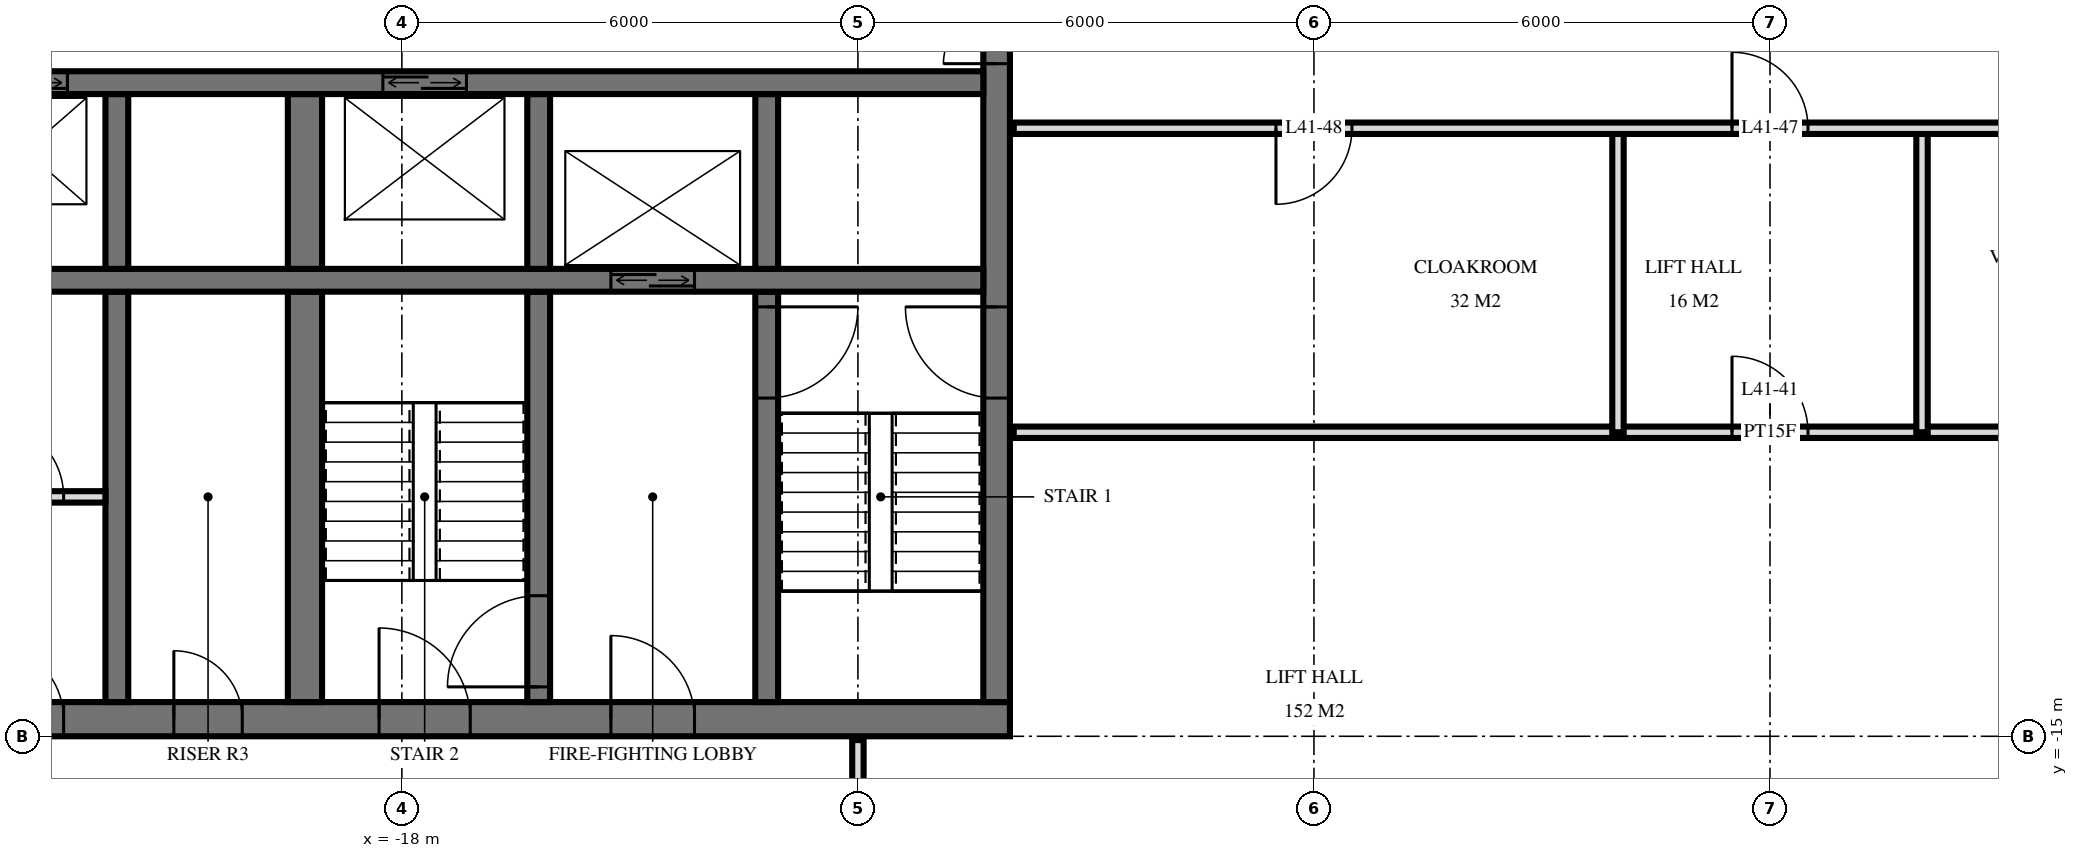
"""IFC4 building model, lengths in metres.
Left out: names, types, materials, properties, quantities, classifications, styles, units other than length and angle.
Written with IfcOpenShell. Run it as: python <this file> out.ifc"""

import sys

from ifc_helpers import new_model, si_unit, direction, frame, frame_2d, origin, place, context, subcontext, project, spatial, rectangle, extrude, element, fill, save


model = new_model("IFC4")
c1 = context("Model", 3, precision=1e-05, world=origin(), true_north=direction((0.0, 1.0)))
c2 = subcontext(c1, "Body", "Model", "MODEL_VIEW")
j1 = project(units=[si_unit("LENGTHUNIT", "METRE"), si_unit("PLANEANGLEUNIT", "RADIAN")], contexts=[c1])
p1 = place(None, origin())
s1 = spatial("IfcSite", under=j1, at=p1, CompositionType="ELEMENT")
p2 = place(p1, origin())
s2 = spatial("IfcBuilding", under=s1, at=p2, CompositionType="ELEMENT")
p3 = place(p2, frame((0.0, 0.0, 159.6)))
s3 = spatial("IfcBuildingStorey", under=s2, at=p3, CompositionType="ELEMENT", Elevation=159.6)
p4 = place(p3, frame((-24.5, -14.775, 0.0), z_axis=(0.0, 0.0, 1.0), x_axis=(1.0, 0.0, 0.0)))
e1 = element("IfcWall", 1, at=p4, inside=s3, PredefinedType="SHEAR", context=c2, shape_type="SweptSolid", body=[
    extrude(rectangle(XDim=14.5, YDim=0.45, at=frame_2d((7.25, 0.0))), origin(), (0.0, 0.0, 1.0), 3.6),
])
p5 = place(p4, frame((6.2, 0.0, 0.0)))
e2 = element("IfcOpeningElement", 2, at=p5, cuts=e1, PredefinedType="OPENING", context=c2, shape_type="SweptSolid", body=[
    extrude(rectangle(XDim=1.2, YDim=2.1, at=frame_2d((0.6, 1.05))), frame((0.0, 0.235, 0.0), z_axis=(0.0, -1.0, 0.0), x_axis=(1.0, 0.0, 0.0)), (0.0, 0.0, 1.0), 0.47),
])
p6 = place(p4, frame((9.25, 0.0, 0.0)))
e3 = element("IfcOpeningElement", 3, at=p6, cuts=e1, PredefinedType="OPENING", context=c2, shape_type="SweptSolid", body=[
    extrude(rectangle(XDim=1.1, YDim=2.1, at=frame_2d((0.55, 1.05))), frame((0.0, 0.235, 0.0), z_axis=(0.0, -1.0, 0.0), x_axis=(1.0, 0.0, 0.0)), (0.0, 0.0, 1.0), 0.47),
])
p7 = place(p4, frame((3.5, 0.0, 0.0)))
e4 = element("IfcOpeningElement", 4, at=p7, cuts=e1, PredefinedType="OPENING", context=c2, shape_type="SweptSolid", body=[
    extrude(rectangle(XDim=0.9, YDim=2.1, at=frame_2d((0.45, 1.05))), frame((0.0, 0.235, 0.0), z_axis=(0.0, -1.0, 0.0), x_axis=(1.0, 0.0, 0.0)), (0.0, 0.0, 1.0), 0.47),
])
p8 = place(p4, frame((1.05, 0.0, 0.0)))
e5 = element("IfcOpeningElement", 5, at=p8, cuts=e1, PredefinedType="OPENING", context=c2, shape_type="SweptSolid", body=[
    extrude(rectangle(XDim=1.0, YDim=2.1, at=frame_2d((0.5, 1.05))), frame((0.0, 0.235, 0.0), z_axis=(0.0, -1.0, 0.0), x_axis=(1.0, 0.0, 0.0)), (0.0, 0.0, 1.0), 0.47),
])
p9 = place(p3, frame((-10.175, -14.55, 0.0), z_axis=(0.0, 0.0, 1.0), x_axis=(0.0, 1.0, 0.0)))
e6 = element("IfcWall", 6, at=p9, inside=s3, PredefinedType="SHEAR", context=c2, shape_type="SweptSolid", body=[
    extrude(rectangle(XDim=14.1, YDim=0.35, at=frame_2d((7.05, 0.0))), origin(), (0.0, 0.0, 1.0), 3.6),
])
p10 = place(p9, frame((8.4, 0.0, 0.0)))
e7 = element("IfcOpeningElement", 7, at=p10, cuts=e6, PredefinedType="OPENING", context=c2, shape_type="SweptSolid", body=[
    extrude(rectangle(XDim=1.4, YDim=2.4, at=frame_2d((0.7, 1.2))), frame((0.0, 0.185, 0.0), z_axis=(0.0, -1.0, 0.0), x_axis=(1.0, 0.0, 0.0)), (0.0, 0.0, 1.0), 0.37),
])
p11 = place(p9, frame((10.0, 0.0, 0.0)))
e8 = element("IfcOpeningElement", 8, at=p11, cuts=e6, PredefinedType="OPENING", context=c2, shape_type="SweptSolid", body=[
    extrude(rectangle(XDim=1.4, YDim=2.4, at=frame_2d((0.7, 1.2))), frame((0.0, 0.185, 0.0), z_axis=(0.0, -1.0, 0.0), x_axis=(1.0, 0.0, 0.0)), (0.0, 0.0, 1.0), 0.37),
])
p12 = place(p9, frame((4.0, 0.0, 0.0)))
e9 = element("IfcOpeningElement", 9, at=p12, cuts=e6, PredefinedType="OPENING", context=c2, shape_type="SweptSolid", body=[
    extrude(rectangle(XDim=1.2, YDim=2.1, at=frame_2d((0.6, 1.05))), frame((0.0, 0.185, 0.0), z_axis=(0.0, -1.0, 0.0), x_axis=(1.0, 0.0, 0.0)), (0.0, 0.0, 1.0), 0.37),
])
p13 = place(p3, frame((-24.05, -6.4, 0.0), z_axis=(0.0, 0.0, 1.0), x_axis=(1.0, 0.0, 0.0)))
e10 = element("IfcWall", 10, at=p13, inside=s3, PredefinedType="SHEAR", context=c2, shape_type="SweptSolid", body=[
    extrude(rectangle(XDim=13.7, YDim=0.3, at=frame_2d((6.85, 0.0))), origin(), (0.0, 0.0, 1.0), 3.6),
])
p14 = place(p13, frame((0.55, 0.0, 0.0)))
e11 = element("IfcOpeningElement", 11, at=p14, cuts=e10, PredefinedType="OPENING", context=c2, shape_type="SweptSolid", body=[
    extrude(rectangle(XDim=1.1, YDim=2.1, at=frame_2d((0.55, 1.05))), frame((0.0, 0.16, 0.0), z_axis=(0.0, -1.0, 0.0), x_axis=(1.0, 0.0, 0.0)), (0.0, 0.0, 1.0), 0.32),
])
p15 = place(p13, frame((5.8, 0.0, 0.0)))
e12 = element("IfcOpeningElement", 12, at=p15, cuts=e10, PredefinedType="OPENING", context=c2, shape_type="SweptSolid", body=[
    extrude(rectangle(XDim=1.1, YDim=2.1, at=frame_2d((0.55, 1.05))), frame((0.0, 0.16, 0.0), z_axis=(0.0, -1.0, 0.0), x_axis=(1.0, 0.0, 0.0)), (0.0, 0.0, 1.0), 0.32),
])
p16 = place(p3, frame((-24.05, -9.0, 0.0), z_axis=(0.0, 0.0, 1.0), x_axis=(1.0, 0.0, 0.0)))
e13 = element("IfcWall", 13, at=p16, inside=s3, PredefinedType="SHEAR", context=c2, shape_type="SweptSolid", body=[
    extrude(rectangle(XDim=13.7, YDim=0.3, at=frame_2d((6.85, 0.0))), origin(), (0.0, 0.0, 1.0), 3.6),
])
p17 = place(p16, frame((8.8, 0.0, 0.0)))
e14 = element("IfcOpeningElement", 14, at=p17, cuts=e13, PredefinedType="OPENING", context=c2, shape_type="SweptSolid", body=[
    extrude(rectangle(XDim=1.1, YDim=2.1, at=frame_2d((0.55, 1.05))), frame((0.0, 0.16, 0.0), z_axis=(0.0, -1.0, 0.0), x_axis=(1.0, 0.0, 0.0)), (0.0, 0.0, 1.0), 0.32),
])
p18 = place(p3, frame((-13.2, -8.85, 0.0), z_axis=(0.0, 0.0, 1.0), x_axis=(0.0, 1.0, 0.0)))
e15 = element("IfcWall", 15, at=p18, inside=s3, PredefinedType="SHEAR", context=c2, shape_type="SweptSolid", body=[
    extrude(rectangle(XDim=2.3, YDim=0.3, at=frame_2d((1.15, 0.0))), origin(), (0.0, 0.0, 1.0), 3.6),
])
p19 = place(p3, frame((-13.2, -14.55, 0.0), z_axis=(0.0, 0.0, 1.0), x_axis=(0.0, 1.0, 0.0)))
e16 = element("IfcWall", 16, at=p19, inside=s3, PredefinedType="SHEAR", context=c2, shape_type="SweptSolid", body=[
    extrude(rectangle(XDim=5.4, YDim=0.3, at=frame_2d((2.7, 0.0))), origin(), (0.0, 0.0, 1.0), 3.6),
])
p20 = place(p19, frame((4.0, 0.0, 0.0)))
e17 = element("IfcOpeningElement", 17, at=p20, cuts=e16, PredefinedType="OPENING", context=c2, shape_type="SweptSolid", body=[
    extrude(rectangle(XDim=1.2, YDim=2.1, at=frame_2d((0.6, 1.05))), frame((0.0, 0.16, 0.0), z_axis=(0.0, -1.0, 0.0), x_axis=(1.0, 0.0, 0.0)), (0.0, 0.0, 1.0), 0.32),
])
p21 = place(p3, frame((-16.2, -8.85, 0.0), z_axis=(0.0, 0.0, 1.0), x_axis=(0.0, 1.0, 0.0)))
e18 = element("IfcWall", 18, at=p21, inside=s3, PredefinedType="SHEAR", context=c2, shape_type="SweptSolid", body=[
    extrude(rectangle(XDim=2.3, YDim=0.3, at=frame_2d((1.15, 0.0))), origin(), (0.0, 0.0, 1.0), 3.6),
])
p22 = place(p3, frame((-16.2, -14.55, 0.0), z_axis=(0.0, 0.0, 1.0), x_axis=(0.0, 1.0, 0.0)))
e19 = element("IfcWall", 19, at=p22, inside=s3, PredefinedType="SHEAR", context=c2, shape_type="SweptSolid", body=[
    extrude(rectangle(XDim=5.4, YDim=0.3, at=frame_2d((2.7, 0.0))), origin(), (0.0, 0.0, 1.0), 3.6),
])
p23 = place(p22, frame((0.2, 0.0, 0.0)))
e20 = element("IfcOpeningElement", 20, at=p23, cuts=e19, PredefinedType="OPENING", context=c2, shape_type="SweptSolid", body=[
    extrude(rectangle(XDim=1.2, YDim=2.1, at=frame_2d((0.6, 1.05))), frame((0.0, 0.16, 0.0), z_axis=(0.0, -1.0, 0.0), x_axis=(1.0, 0.0, 0.0)), (0.0, 0.0, 1.0), 0.32),
])
p24 = place(p3, frame((-19.275, -8.85, 0.0), z_axis=(0.0, 0.0, 1.0), x_axis=(0.0, 1.0, 0.0)))
e21 = element("IfcWall", 21, at=p24, inside=s3, PredefinedType="SHEAR", context=c2, shape_type="SweptSolid", body=[
    extrude(rectangle(XDim=2.3, YDim=0.45, at=frame_2d((1.15, 0.0))), origin(), (0.0, 0.0, 1.0), 3.6),
])
p25 = place(p3, frame((-19.275, -14.55, 0.0), z_axis=(0.0, 0.0, 1.0), x_axis=(0.0, 1.0, 0.0)))
e22 = element("IfcWall", 22, at=p25, inside=s3, PredefinedType="SHEAR", context=c2, shape_type="SweptSolid", body=[
    extrude(rectangle(XDim=5.4, YDim=0.45, at=frame_2d((2.7, 0.0))), origin(), (0.0, 0.0, 1.0), 3.6),
])
p26 = place(p3, frame((-21.75, -8.85, 0.0), z_axis=(0.0, 0.0, 1.0), x_axis=(0.0, 1.0, 0.0)))
e23 = element("IfcWall", 23, at=p26, inside=s3, PredefinedType="SHEAR", context=c2, shape_type="SweptSolid", body=[
    extrude(rectangle(XDim=2.3, YDim=0.3, at=frame_2d((1.15, 0.0))), origin(), (0.0, 0.0, 1.0), 3.6),
])
p27 = place(p3, frame((-21.75, -14.55, 0.0), z_axis=(0.0, 0.0, 1.0), x_axis=(0.0, 1.0, 0.0)))
e24 = element("IfcWall", 24, at=p27, inside=s3, PredefinedType="SHEAR", context=c2, shape_type="SweptSolid", body=[
    extrude(rectangle(XDim=5.4, YDim=0.3, at=frame_2d((2.7, 0.0))), origin(), (0.0, 0.0, 1.0), 3.6),
])
p28 = place(p3, frame((-24.0, -11.85, 0.0), z_axis=(0.0, 0.0, 1.0), x_axis=(1.0, 0.0, 0.0)))
e25 = element("IfcWall", 25, at=p28, inside=s3, PredefinedType="PARTITIONING", context=c2, shape_type="SweptSolid", body=[
    extrude(rectangle(XDim=2.1, YDim=0.15, at=frame_2d((1.05, 0.0))), origin(), (0.0, 0.0, 1.0), 3.3),
])
p29 = place(p28, frame((0.55, 0.0, 0.0)))
e26 = element("IfcOpeningElement", 26, at=p29, cuts=e25, PredefinedType="OPENING", context=c2, shape_type="SweptSolid", body=[
    extrude(rectangle(XDim=1.0, YDim=2.1, at=frame_2d((0.5, 1.05))), frame((0.0, 0.085, 0.0), z_axis=(0.0, -1.0, 0.0), x_axis=(1.0, 0.0, 0.0)), (0.0, 0.0, 1.0), 0.17),
])
for number, where, z_axis, x_axis in (
    (27, (2.0, -11.0, 0.0), (0.0, 0.0, 1.0), (0.0, 1.0, 0.0)),
    (28, (-2.0, -11.0, 0.0), (0.0, 0.0, 1.0), (0.0, 1.0, 0.0)),
):
    element("IfcWall", number, at=place(p3, frame(where, z_axis=z_axis, x_axis=x_axis)), inside=s3, PredefinedType="PARTITIONING", context=c2, shape_type="SweptSolid", body=[
        extrude(rectangle(XDim=4.0, YDim=0.15, at=frame_2d((2.0, 0.0))), origin(), (0.0, 0.0, 1.0), 3.32),
    ])
p30 = place(p3, frame((-12.0, -21.0, 0.0), z_axis=(0.0, 0.0, 1.0), x_axis=(0.0, 1.0, 0.0)))
e29 = element("IfcWall", 29, at=p30, inside=s3, PredefinedType="PARTITIONING", context=c2, shape_type="SweptSolid", body=[
    extrude(rectangle(XDim=5.95, YDim=0.15, at=frame_2d((2.975, 0.0))), origin(), (0.0, 0.0, 1.0), 3.32),
])
p31 = place(p30, frame((4.0, 0.0, 0.0)))
e30 = element("IfcOpeningElement", 30, at=p31, cuts=e29, PredefinedType="OPENING", context=c2, shape_type="SweptSolid", body=[
    extrude(rectangle(XDim=1.0, YDim=2.1, at=frame_2d((0.5, 1.05))), frame((0.0, 0.085, 0.0), z_axis=(0.0, -1.0, 0.0), x_axis=(1.0, 0.0, 0.0)), (0.0, 0.0, 1.0), 0.17),
])
p32 = place(p3, frame((-9.95, -11.0, 0.0), z_axis=(0.0, 0.0, 1.0), x_axis=(1.0, 0.0, 0.0)))
e31 = element("IfcWall", 31, at=p32, inside=s3, PredefinedType="PARTITIONING", context=c2, shape_type="SweptSolid", body=[
    extrude(rectangle(XDim=19.9, YDim=0.15, at=frame_2d((9.95, 0.0))), origin(), (0.0, 0.0, 1.0), 3.32),
])
p33 = place(p32, frame((9.45, 0.0, 0.0)))
e32 = element("IfcOpeningElement", 32, at=p33, cuts=e31, PredefinedType="OPENING", context=c2, shape_type="SweptSolid", body=[
    extrude(rectangle(XDim=1.0, YDim=2.1, at=frame_2d((0.5, 1.05))), frame((0.0, 0.085, 0.0), z_axis=(0.0, -1.0, 0.0), x_axis=(1.0, 0.0, 0.0)), (0.0, 0.0, 1.0), 0.17),
])
p34 = place(p32, frame((15.45, 0.0, 0.0)))
e33 = element("IfcOpeningElement", 33, at=p34, cuts=e31, PredefinedType="OPENING", context=c2, shape_type="SweptSolid", body=[
    extrude(rectangle(XDim=1.0, YDim=2.1, at=frame_2d((0.5, 1.05))), frame((0.0, 0.085, 0.0), z_axis=(0.0, -1.0, 0.0), x_axis=(1.0, 0.0, 0.0)), (0.0, 0.0, 1.0), 0.17),
])
p35 = place(p3, frame((-9.95, -7.0, 0.0), z_axis=(0.0, 0.0, 1.0), x_axis=(1.0, 0.0, 0.0)))
e34 = element("IfcWall", 34, at=p35, inside=s3, PredefinedType="PARTITIONING", context=c2, shape_type="SweptSolid", body=[
    extrude(rectangle(XDim=19.9, YDim=0.15, at=frame_2d((9.95, 0.0))), origin(), (0.0, 0.0, 1.0), 3.32),
])
p36 = place(p35, frame((9.45, 0.0, 0.0)))
e35 = element("IfcOpeningElement", 35, at=p36, cuts=e34, PredefinedType="OPENING", context=c2, shape_type="SweptSolid", body=[
    extrude(rectangle(XDim=1.0, YDim=2.1, at=frame_2d((0.5, 1.05))), frame((0.0, 0.085, 0.0), z_axis=(0.0, -1.0, 0.0), x_axis=(1.0, 0.0, 0.0)), (0.0, 0.0, 1.0), 0.17),
])
p37 = place(p35, frame((3.45, 0.0, 0.0)))
e36 = element("IfcOpeningElement", 36, at=p37, cuts=e34, PredefinedType="OPENING", context=c2, shape_type="SweptSolid", body=[
    extrude(rectangle(XDim=1.0, YDim=2.1, at=frame_2d((0.5, 1.05))), frame((0.0, 0.085, 0.0), z_axis=(0.0, -1.0, 0.0), x_axis=(1.0, 0.0, 0.0)), (0.0, 0.0, 1.0), 0.17),
])
p38 = place(p14, origin())
e37 = element("IfcDoor", 37, at=p38, inside=s3, OperationType="DOUBLE_DOOR_SLIDING", PredefinedType="USERDEFINED", context=c2, shape_type="SweptSolid", body=[
    extrude(rectangle(XDim=1.1, YDim=2.1, at=frame_2d((0.55, 1.05))), frame((0.0, 0.025, 0.0), z_axis=(0.0, -1.0, 0.0), x_axis=(1.0, 0.0, 0.0)), (0.0, 0.0, 1.0), 0.05),
])
fill(e11, e37)
p39 = place(p17, origin())
e38 = element("IfcDoor", 38, at=p39, inside=s3, OperationType="DOUBLE_DOOR_SLIDING", PredefinedType="USERDEFINED", context=c2, shape_type="SweptSolid", body=[
    extrude(rectangle(XDim=1.1, YDim=2.1, at=frame_2d((0.55, 1.05))), frame((0.0, 0.025, 0.0), z_axis=(0.0, -1.0, 0.0), x_axis=(1.0, 0.0, 0.0)), (0.0, 0.0, 1.0), 0.05),
])
fill(e14, e38)
p40 = place(p15, origin())
e39 = element("IfcDoor", 39, at=p40, inside=s3, OperationType="DOUBLE_DOOR_SLIDING", PredefinedType="USERDEFINED", context=c2, shape_type="SweptSolid", body=[
    extrude(rectangle(XDim=1.1, YDim=2.1, at=frame_2d((0.55, 1.05))), frame((0.0, 0.025, 0.0), z_axis=(0.0, -1.0, 0.0), x_axis=(1.0, 0.0, 0.0)), (0.0, 0.0, 1.0), 0.05),
])
fill(e12, e39)
p41 = place(p10, origin())
e40 = element("IfcDoor", 40, at=p41, inside=s3, OperationType="DOUBLE_DOOR_SINGLE_SWING", PredefinedType="DOOR", context=c2, shape_type="SweptSolid", body=[
    extrude(rectangle(XDim=1.4, YDim=2.4, at=frame_2d((0.7, 1.2))), frame((0.0, 0.025, 0.0), z_axis=(0.0, -1.0, 0.0), x_axis=(1.0, 0.0, 0.0)), (0.0, 0.0, 1.0), 0.05),
])
fill(e7, e40)
p42 = place(p12, origin())
e41 = element("IfcDoor", 41, at=p42, inside=s3, OperationType="SINGLE_SWING_LEFT", PredefinedType="DOOR", context=c2, shape_type="SweptSolid", body=[
    extrude(rectangle(XDim=1.2, YDim=2.1, at=frame_2d((0.6, 1.05))), frame((0.0, 0.025, 0.0), z_axis=(0.0, -1.0, 0.0), x_axis=(1.0, 0.0, 0.0)), (0.0, 0.0, 1.0), 0.05),
])
fill(e9, e41)
p43 = place(p5, origin())
e42 = element("IfcDoor", 42, at=p43, inside=s3, OperationType="SINGLE_SWING_RIGHT", PredefinedType="DOOR", context=c2, shape_type="SweptSolid", body=[
    extrude(rectangle(XDim=1.2, YDim=2.1, at=frame_2d((0.6, 1.05))), frame((0.0, 0.025, 0.0), z_axis=(0.0, -1.0, 0.0), x_axis=(1.0, 0.0, 0.0)), (0.0, 0.0, 1.0), 0.05),
])
fill(e2, e42)
p44 = place(p6, origin())
e43 = element("IfcDoor", 43, at=p44, inside=s3, OperationType="SINGLE_SWING_RIGHT", PredefinedType="DOOR", context=c2, shape_type="SweptSolid", body=[
    extrude(rectangle(XDim=1.1, YDim=2.1, at=frame_2d((0.55, 1.05))), frame((0.0, 0.025, 0.0), z_axis=(0.0, -1.0, 0.0), x_axis=(1.0, 0.0, 0.0)), (0.0, 0.0, 1.0), 0.05),
])
fill(e3, e43)
p45 = place(p7, origin())
e44 = element("IfcDoor", 44, at=p45, inside=s3, OperationType="SINGLE_SWING_RIGHT", PredefinedType="DOOR", context=c2, shape_type="SweptSolid", body=[
    extrude(rectangle(XDim=0.9, YDim=2.1, at=frame_2d((0.45, 1.05))), frame((0.0, 0.025, 0.0), z_axis=(0.0, -1.0, 0.0), x_axis=(1.0, 0.0, 0.0)), (0.0, 0.0, 1.0), 0.05),
])
fill(e4, e44)
p46 = place(p8, origin())
e45 = element("IfcDoor", 45, at=p46, inside=s3, OperationType="SINGLE_SWING_RIGHT", PredefinedType="DOOR", context=c2, shape_type="SweptSolid", body=[
    extrude(rectangle(XDim=1.0, YDim=2.1, at=frame_2d((0.5, 1.05))), frame((0.0, 0.025, 0.0), z_axis=(0.0, -1.0, 0.0), x_axis=(1.0, 0.0, 0.0)), (0.0, 0.0, 1.0), 0.05),
])
fill(e5, e45)
p47 = place(p20, frame((0.6, 0.0, 0.0), z_axis=(0.0, 0.0, 1.0), x_axis=(-1.0, 0.0, 0.0)))
e46 = element("IfcDoor", 46, at=p47, inside=s3, OperationType="SINGLE_SWING_RIGHT", PredefinedType="DOOR", context=c2, shape_type="SweptSolid", body=[
    extrude(rectangle(XDim=1.2, YDim=2.1, at=frame_2d((0.0, 1.05))), frame((0.0, -0.025, 0.0), z_axis=(0.0, 1.0, 0.0), x_axis=(-1.0, 0.0, 0.0)), (0.0, 0.0, 1.0), 0.05),
])
fill(e17, e46)
p48 = place(p23, origin())
e47 = element("IfcDoor", 47, at=p48, inside=s3, OperationType="SINGLE_SWING_RIGHT", PredefinedType="DOOR", context=c2, shape_type="SweptSolid", body=[
    extrude(rectangle(XDim=1.2, YDim=2.1, at=frame_2d((0.6, 1.05))), frame((0.0, 0.025, 0.0), z_axis=(0.0, -1.0, 0.0), x_axis=(1.0, 0.0, 0.0)), (0.0, 0.0, 1.0), 0.05),
])
fill(e20, e47)
p49 = place(p29, origin())
e48 = element("IfcDoor", 48, at=p49, inside=s3, OperationType="SINGLE_SWING_RIGHT", PredefinedType="DOOR", context=c2, shape_type="SweptSolid", body=[
    extrude(rectangle(XDim=1.0, YDim=2.1, at=frame_2d((0.5, 1.05))), frame((0.0, 0.025, 0.0), z_axis=(0.0, -1.0, 0.0), x_axis=(1.0, 0.0, 0.0)), (0.0, 0.0, 1.0), 0.05),
])
fill(e26, e48)
p50 = place(p33, origin())
e49 = element("IfcDoor", 49, at=p50, inside=s3, OperationType="SINGLE_SWING_RIGHT", PredefinedType="DOOR", context=c2, shape_type="SweptSolid", body=[
    extrude(rectangle(XDim=1.0, YDim=2.1, at=frame_2d((0.5, 1.05))), frame((0.0, 0.025, 0.0), z_axis=(0.0, -1.0, 0.0), x_axis=(1.0, 0.0, 0.0)), (0.0, 0.0, 1.0), 0.05),
])
fill(e32, e49)
p51 = place(p36, origin())
e50 = element("IfcDoor", 50, at=p51, inside=s3, OperationType="SINGLE_SWING_RIGHT", PredefinedType="DOOR", context=c2, shape_type="SweptSolid", body=[
    extrude(rectangle(XDim=1.0, YDim=2.1, at=frame_2d((0.5, 1.05))), frame((0.0, 0.025, 0.0), z_axis=(0.0, -1.0, 0.0), x_axis=(1.0, 0.0, 0.0)), (0.0, 0.0, 1.0), 0.05),
])
fill(e35, e50)
p52 = place(p37, frame((0.5, 0.0, 0.0), z_axis=(0.0, 0.0, 1.0), x_axis=(-1.0, 0.0, 0.0)))
e51 = element("IfcDoor", 51, at=p52, inside=s3, OperationType="SINGLE_SWING_LEFT", PredefinedType="DOOR", context=c2, shape_type="SweptSolid", body=[
    extrude(rectangle(XDim=1.0, YDim=2.1, at=frame_2d((0.0, 1.05))), frame((0.0, -0.025, 0.0), z_axis=(0.0, 1.0, 0.0), x_axis=(-1.0, 0.0, 0.0)), (0.0, 0.0, 1.0), 0.05),
])
fill(e36, e51)
save(model, sys.argv[1])
